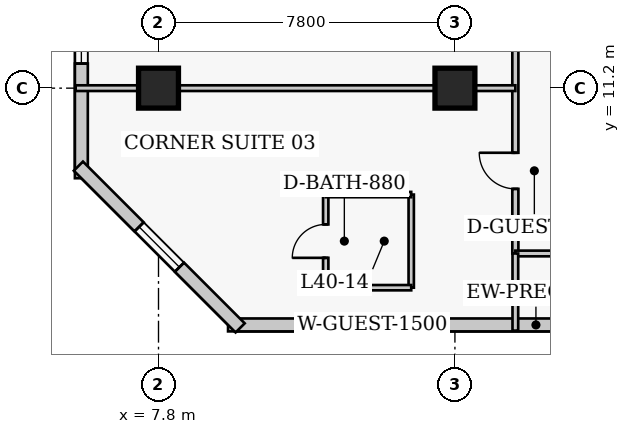
"""IFC4 building model, lengths in metres.
Left out: names, types, materials, properties, quantities, classifications, styles, units other than length and angle.
Written with IfcOpenShell. Run it as: python <this file> out.ifc"""

import sys

from ifc_helpers import new_model, si_unit, direction, frame, frame_2d, origin, origin_2d, place, context, subcontext, project, spatial, rectangle, extrude, element, fill, save


model = new_model("IFC4")
c1 = context("Model", 3, precision=1e-05, world=origin(), true_north=direction((0.0, 1.0)))
c2 = subcontext(c1, "Body", "Model", "MODEL_VIEW")
j1 = project(units=[si_unit("LENGTHUNIT", "METRE"), si_unit("PLANEANGLEUNIT", "RADIAN")], contexts=[c1])
p1 = place(None, origin())
s1 = spatial("IfcSite", under=j1, at=p1, CompositionType="ELEMENT")
p2 = place(p1, origin())
s2 = spatial("IfcBuilding", under=s1, at=p2, CompositionType="ELEMENT")
p3 = place(p2, frame((0.0, 0.0, 161.2)))
s3 = spatial("IfcBuildingStorey", under=s2, at=p3, CompositionType="ELEMENT", Elevation=161.2)
for number, where, z_axis, x_axis in (
    (1, (7.8, 11.2, 0.0), (0.0, 0.0, 1.0), (1.0, 0.0, 0.0)),
    (2, (15.6, 11.2, 0.0), (0.0, 0.0, 1.0), (1.0, 0.0, 0.0)),
):
    element("IfcColumn", number, at=place(p3, frame(where, z_axis=z_axis, x_axis=x_axis)), inside=s3, PredefinedType="COLUMN", context=c2, shape_type="SweptSolid", body=[
        extrude(rectangle(XDim=1.05, YDim=1.05, at=origin_2d()), origin(), (0.0, 0.0, 1.0), 3.8),
    ])
p4 = place(p3, frame((9.63, 4.97, 0.0), z_axis=(0.0, 0.0, 1.0), x_axis=(1.0, 0.0, 0.0)))
e3 = element("IfcWall", 3, at=p4, inside=s3, PredefinedType="SOLIDWALL", context=c2, shape_type="SweptSolid", body=[
    extrude(rectangle(XDim=26.69, YDim=0.34, at=frame_2d((13.345, 0.0))), origin(), (0.0, 0.0, 1.0), 3.55),
])
p5 = place(p4, frame((3.048, 0.0, 0.85)))
e4 = element("IfcOpeningElement", 4, at=p5, cuts=e3, PredefinedType="OPENING", context=c2, shape_type="SweptSolid", body=[
    extrude(rectangle(XDim=1.5, YDim=1.75, at=frame_2d((0.75, 0.875))), frame((0.0, 0.18, 0.0), z_axis=(0.0, -1.0, 0.0), x_axis=(1.0, 0.0, 0.0)), (0.0, 0.0, 1.0), 0.36),
])
p6 = place(p4, frame((22.642, 0.0, 0.85)))
e5 = element("IfcOpeningElement", 5, at=p6, cuts=e3, PredefinedType="OPENING", context=c2, shape_type="SweptSolid", body=[
    extrude(rectangle(XDim=1.5, YDim=1.75, at=frame_2d((0.75, 0.875))), frame((0.0, 0.18, 0.0), z_axis=(0.0, -1.0, 0.0), x_axis=(1.0, 0.0, 0.0)), (0.0, 0.0, 1.0), 0.36),
])
p7 = place(p4, frame((11.655, 0.0, 0.85)))
e6 = element("IfcOpeningElement", 6, at=p7, cuts=e3, PredefinedType="OPENING", context=c2, shape_type="SweptSolid", body=[
    extrude(rectangle(XDim=1.3, YDim=1.7, at=frame_2d((0.65, 0.85))), frame((0.0, 0.18, 0.0), z_axis=(0.0, -1.0, 0.0), x_axis=(1.0, 0.0, 0.0)), (0.0, 0.0, 1.0), 0.36),
])
p8 = place(p4, frame((16.715, 0.0, 0.85)))
e7 = element("IfcOpeningElement", 7, at=p8, cuts=e3, PredefinedType="OPENING", context=c2, shape_type="SweptSolid", body=[
    extrude(rectangle(XDim=1.3, YDim=1.7, at=frame_2d((0.65, 0.85))), frame((0.0, 0.18, 0.0), z_axis=(0.0, -1.0, 0.0), x_axis=(1.0, 0.0, 0.0)), (0.0, 0.0, 1.0), 0.36),
])
p9 = place(p3, frame((5.77, 38.97, 0.0), z_axis=(0.0, 0.0, 1.0), x_axis=(0.0, -1.0, 0.0)))
e8 = element("IfcWall", 8, at=p9, inside=s3, PredefinedType="SOLIDWALL", context=c2, shape_type="SweptSolid", body=[
    extrude(rectangle(XDim=30.14, YDim=0.34, at=frame_2d((15.07, 0.0))), origin(), (0.0, 0.0, 1.0), 3.55),
])
p10 = place(p9, frame((3.018, 0.0, 0.85)))
e9 = element("IfcOpeningElement", 9, at=p10, cuts=e8, PredefinedType="OPENING", context=c2, shape_type="SweptSolid", body=[
    extrude(rectangle(XDim=1.5, YDim=1.75, at=frame_2d((0.75, 0.875))), frame((0.0, 0.18, 0.0), z_axis=(0.0, -1.0, 0.0), x_axis=(1.0, 0.0, 0.0)), (0.0, 0.0, 1.0), 0.36),
])
p11 = place(p9, frame((10.552, 0.0, 0.85)))
e10 = element("IfcOpeningElement", 10, at=p11, cuts=e8, PredefinedType="OPENING", context=c2, shape_type="SweptSolid", body=[
    extrude(rectangle(XDim=1.5, YDim=1.75, at=frame_2d((0.75, 0.875))), frame((0.0, 0.18, 0.0), z_axis=(0.0, -1.0, 0.0), x_axis=(1.0, 0.0, 0.0)), (0.0, 0.0, 1.0), 0.36),
])
p12 = place(p9, frame((16.938, 0.0, 0.85)))
e11 = element("IfcOpeningElement", 11, at=p12, cuts=e8, PredefinedType="OPENING", context=c2, shape_type="SweptSolid", body=[
    extrude(rectangle(XDim=1.5, YDim=1.75, at=frame_2d((0.75, 0.875))), frame((0.0, 0.18, 0.0), z_axis=(0.0, -1.0, 0.0), x_axis=(1.0, 0.0, 0.0)), (0.0, 0.0, 1.0), 0.36),
])
p13 = place(p9, frame((25.623, 0.0, 0.85)))
e12 = element("IfcOpeningElement", 12, at=p13, cuts=e8, PredefinedType="OPENING", context=c2, shape_type="SweptSolid", body=[
    extrude(rectangle(XDim=1.5, YDim=1.75, at=frame_2d((0.75, 0.875))), frame((0.0, 0.18, 0.0), z_axis=(0.0, -1.0, 0.0), x_axis=(1.0, 0.0, 0.0)), (0.0, 0.0, 1.0), 0.36),
])
p14 = place(p3, frame((5.692, 9.148, 0.0), z_axis=(0.0, 0.0, 1.0), x_axis=(0.707106781187, -0.707106781187, 0.0)))
e13 = element("IfcWall", 13, at=p14, inside=s3, PredefinedType="SOLIDWALL", context=c2, shape_type="SweptSolid", body=[
    extrude(rectangle(XDim=6.02, YDim=0.34, at=frame_2d((3.01, 0.0))), origin(), (0.0, 0.0, 1.0), 3.55),
])
p15 = place(p14, frame((2.26, 0.0, 0.85)))
e14 = element("IfcOpeningElement", 14, at=p15, cuts=e13, PredefinedType="OPENING", context=c2, shape_type="SweptSolid", body=[
    extrude(rectangle(XDim=1.5, YDim=1.75, at=frame_2d((0.75, 0.875))), frame((0.0, 0.18, 0.0), z_axis=(0.0, -1.0, 0.0), x_axis=(1.0, 0.0, 0.0)), (0.0, 0.0, 1.0), 0.36),
])
p16 = place(p3, frame((17.19, 6.85, 0.0), z_axis=(0.0, 0.0, 1.0), x_axis=(0.0, 1.0, 0.0)))
e15 = element("IfcWall", 15, at=p16, inside=s3, PredefinedType="PARTITIONING", context=c2, shape_type="SweptSolid", body=[
    extrude(rectangle(XDim=33.8, YDim=0.16, at=frame_2d((16.9, 0.0))), origin(), (0.0, 0.0, 1.0), 3.55),
])
p17 = place(p16, frame((1.7, 0.0, 0.0)))
e16 = element("IfcOpeningElement", 16, at=p17, cuts=e15, PredefinedType="OPENING", context=c2, shape_type="SweptSolid", body=[
    extrude(rectangle(XDim=0.95, YDim=2.1, at=frame_2d((0.475, 1.05))), frame((0.0, 0.09, 0.0), z_axis=(0.0, -1.0, 0.0), x_axis=(1.0, 0.0, 0.0)), (0.0, 0.0, 1.0), 0.18),
])
p18 = place(p16, frame((8.275, 0.0, 0.0)))
e17 = element("IfcOpeningElement", 17, at=p18, cuts=e15, PredefinedType="OPENING", context=c2, shape_type="SweptSolid", body=[
    extrude(rectangle(XDim=0.95, YDim=2.1, at=frame_2d((0.475, 1.05))), frame((0.0, 0.09, 0.0), z_axis=(0.0, -1.0, 0.0), x_axis=(1.0, 0.0, 0.0)), (0.0, 0.0, 1.0), 0.18),
])
p19 = place(p16, frame((14.543, 0.0, 0.0)))
e18 = element("IfcOpeningElement", 18, at=p19, cuts=e15, PredefinedType="OPENING", context=c2, shape_type="SweptSolid", body=[
    extrude(rectangle(XDim=0.95, YDim=2.1, at=frame_2d((0.475, 1.05))), frame((0.0, 0.09, 0.0), z_axis=(0.0, -1.0, 0.0), x_axis=(1.0, 0.0, 0.0)), (0.0, 0.0, 1.0), 0.18),
])
p20 = place(p16, frame((32.36, 0.0, 0.0)))
e19 = element("IfcOpeningElement", 19, at=p20, cuts=e15, PredefinedType="OPENING", context=c2, shape_type="SweptSolid", body=[
    extrude(rectangle(XDim=1.0, YDim=2.15, at=frame_2d((0.5, 1.075))), frame((0.0, 0.09, 0.0), z_axis=(0.0, -1.0, 0.0), x_axis=(1.0, 0.0, 0.0)), (0.0, 0.0, 1.0), 0.18),
])
p21 = place(p3, frame((17.19, 6.85, 0.0), z_axis=(0.0, 0.0, 1.0), x_axis=(1.0, 0.0, 0.0)))
e20 = element("IfcWall", 20, at=p21, inside=s3, PredefinedType="PARTITIONING", context=c2, shape_type="SweptSolid", body=[
    extrude(rectangle(XDim=2.22, YDim=0.15, at=frame_2d((1.11, 0.0))), origin(), (0.0, 0.0, 1.0), 3.55),
])
p22 = place(p3, frame((17.19, 4.82, 0.0), z_axis=(0.0, 0.0, 1.0), x_axis=(0.0, 1.0, 0.0)))
e21 = element("IfcWall", 21, at=p22, inside=s3, PredefinedType="PARTITIONING", context=c2, shape_type="SweptSolid", body=[
    extrude(rectangle(XDim=2.03, YDim=0.15, at=frame_2d((1.015, 0.0))), origin(), (0.0, 0.0, 1.0), 3.55),
])
p23 = place(p3, frame((12.2, 5.95, 0.0), z_axis=(0.0, 0.0, 1.0), x_axis=(0.0, 1.0, 0.0)))
e22 = element("IfcWall", 22, at=p23, inside=s3, PredefinedType="PLUMBINGWALL", context=c2, shape_type="SweptSolid", body=[
    extrude(rectangle(XDim=2.45, YDim=0.14, at=frame_2d((1.225, 0.0))), origin(), (0.0, 0.0, 1.0), 3.55),
])
p24 = place(p23, frame((0.785, 0.0, 0.0)))
e23 = element("IfcOpeningElement", 23, at=p24, cuts=e22, PredefinedType="OPENING", context=c2, shape_type="SweptSolid", body=[
    extrude(rectangle(XDim=0.88, YDim=2.05, at=frame_2d((0.44, 1.025))), frame((0.0, 0.08, 0.0), z_axis=(0.0, -1.0, 0.0), x_axis=(1.0, 0.0, 0.0)), (0.0, 0.0, 1.0), 0.16),
])
p25 = place(p3, frame((14.45, 5.95, 0.0), z_axis=(0.0, 0.0, 1.0), x_axis=(0.0, 1.0, 0.0)))
e24 = element("IfcWall", 24, at=p25, inside=s3, PredefinedType="PLUMBINGWALL", context=c2, shape_type="SweptSolid", body=[
    extrude(rectangle(XDim=2.45, YDim=0.14, at=frame_2d((1.225, 0.0))), origin(), (0.0, 0.0, 1.0), 3.55),
])
for number, where, z_axis, x_axis in (
    (25, (12.2, 5.95, 0.0), (0.0, 0.0, 1.0), (1.0, 0.0, 0.0)),
    (26, (12.2, 8.4, 0.0), (0.0, 0.0, 1.0), (1.0, 0.0, 0.0)),
):
    element("IfcWall", number, at=place(p3, frame(where, z_axis=z_axis, x_axis=x_axis)), inside=s3, PredefinedType="PLUMBINGWALL", context=c2, shape_type="SweptSolid", body=[
        extrude(rectangle(XDim=2.25, YDim=0.14, at=frame_2d((1.125, 0.0))), origin(), (0.0, 0.0, 1.0), 3.55),
    ])
p26 = place(p3, frame((5.62, 11.2, 0.0), z_axis=(0.0, 0.0, 1.0), x_axis=(1.0, 0.0, 0.0)))
e27 = element("IfcWall", 27, at=p26, inside=s3, PredefinedType="PARTITIONING", context=c2, shape_type="SweptSolid", body=[
    extrude(rectangle(XDim=11.57, YDim=0.15, at=frame_2d((5.785, 0.0))), origin(), (0.0, 0.0, 1.0), 2.778),
])
p27 = place(p5, origin())
e28 = element("IfcWindow", 28, at=p27, inside=s3, PartitioningType="SINGLE_PANEL", PredefinedType="WINDOW", context=c2, shape_type="SweptSolid", body=[
    extrude(rectangle(XDim=1.5, YDim=1.75, at=frame_2d((0.75, 0.875))), frame((0.0, 0.03, 0.0), z_axis=(0.0, -1.0, 0.0), x_axis=(1.0, 0.0, 0.0)), (0.0, 0.0, 1.0), 0.06),
])
fill(e4, e28)
p28 = place(p13, origin())
e29 = element("IfcWindow", 29, at=p28, inside=s3, PartitioningType="SINGLE_PANEL", PredefinedType="WINDOW", context=c2, shape_type="SweptSolid", body=[
    extrude(rectangle(XDim=1.5, YDim=1.75, at=frame_2d((0.75, 0.875))), frame((0.0, 0.03, 0.0), z_axis=(0.0, -1.0, 0.0), x_axis=(1.0, 0.0, 0.0)), (0.0, 0.0, 1.0), 0.06),
])
fill(e12, e29)
p29 = place(p15, origin())
e30 = element("IfcWindow", 30, at=p29, inside=s3, PartitioningType="SINGLE_PANEL", PredefinedType="WINDOW", context=c2, shape_type="SweptSolid", body=[
    extrude(rectangle(XDim=1.5, YDim=1.75, at=frame_2d((0.75, 0.875))), frame((0.0, 0.03, 0.0), z_axis=(0.0, -1.0, 0.0), x_axis=(1.0, 0.0, 0.0)), (0.0, 0.0, 1.0), 0.06),
])
fill(e14, e30)
p30 = place(p24, origin())
e31 = element("IfcDoor", 31, at=p30, inside=s3, OperationType="SINGLE_SWING_LEFT", PredefinedType="DOOR", context=c2, shape_type="SweptSolid", body=[
    extrude(rectangle(XDim=0.88, YDim=2.05, at=frame_2d((0.44, 1.025))), frame((0.0, 0.025, 0.0), z_axis=(0.0, -1.0, 0.0), x_axis=(1.0, 0.0, 0.0)), (0.0, 0.0, 1.0), 0.05),
])
fill(e23, e31)
p31 = place(p17, origin())
e32 = element("IfcDoor", 32, at=p31, inside=s3, OperationType="SINGLE_SWING_RIGHT", PredefinedType="DOOR", context=c2, shape_type="SweptSolid", body=[
    extrude(rectangle(XDim=0.95, YDim=2.1, at=frame_2d((0.475, 1.05))), frame((0.0, 0.025, 0.0), z_axis=(0.0, -1.0, 0.0), x_axis=(1.0, 0.0, 0.0)), (0.0, 0.0, 1.0), 0.05),
])
fill(e16, e32)
save(model, sys.argv[1])
